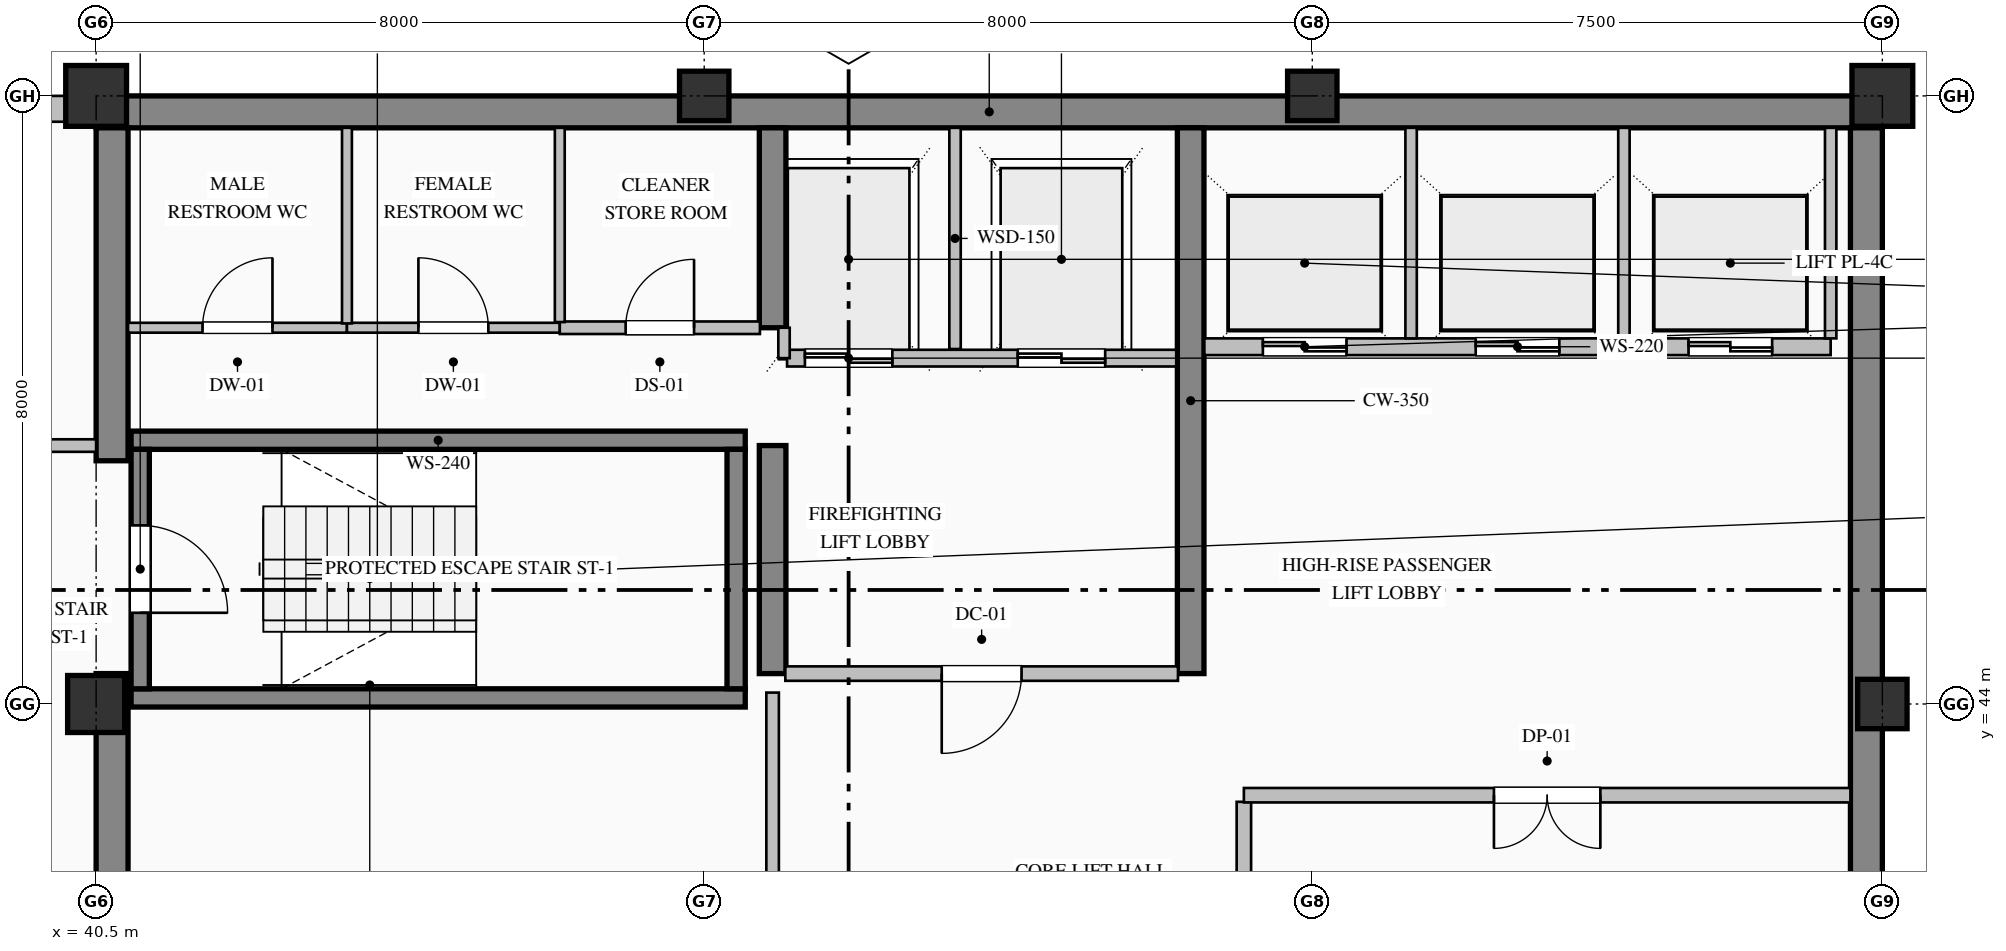
"""IFC4 building model, lengths in metres.
Left out: names, types, materials, properties, quantities, classifications, styles, units other than length and angle.
Written with IfcOpenShell. Run it as: python <this file> out.ifc"""

import sys

from ifc_helpers import new_model, si_unit, direction, frame, frame_2d, origin, origin_2d, place, context, subcontext, project, spatial, rectangle, hollow_rectangle, extrude, element, fill, save


model = new_model("IFC4")
c1 = context("Model", 3, precision=1e-05, world=origin(), true_north=direction((0.0, 1.0)))
c2 = subcontext(c1, "Body", "Model", "MODEL_VIEW")
j1 = project(units=[si_unit("LENGTHUNIT", "METRE"), si_unit("PLANEANGLEUNIT", "RADIAN")], contexts=[c1])
p1 = place(None, origin())
s1 = spatial("IfcSite", under=j1, at=p1, CompositionType="ELEMENT")
p2 = place(p1, origin())
s2 = spatial("IfcBuilding", under=s1, at=p2, CompositionType="ELEMENT")
p3 = place(p2, frame((0.0, 0.0, 351.2)))
s3 = spatial("IfcBuildingStorey", under=s2, at=p3, CompositionType="ELEMENT", Elevation=351.2)
p4 = place(p3, frame((40.5, 51.79, 0.0), z_axis=(0.0, 0.0, 1.0), x_axis=(1.0, 0.0, 0.0)))
e1 = element("IfcWall", 1, at=p4, inside=s3, PredefinedType="SHEAR", context=c2, shape_type="SweptSolid", body=[
    extrude(rectangle(XDim=23.5, YDim=0.42, at=frame_2d((11.75, 0.0))), origin(), (0.0, 0.0, 1.0), 3.785),
])
p5 = place(p3, frame((63.79, 36.32, 0.0), z_axis=(0.0, 0.0, 1.0), x_axis=(0.0, 1.0, 0.0)))
e2 = element("IfcWall", 2, at=p5, inside=s3, PredefinedType="SHEAR", context=c2, shape_type="SweptSolid", body=[
    extrude(rectangle(XDim=15.26, YDim=0.42, at=frame_2d((7.63, 0.0))), origin(), (0.0, 0.0, 1.0), 3.785),
])
p6 = place(p3, frame((40.71, 36.42, 0.0), z_axis=(0.0, 0.0, 1.0), x_axis=(0.0, 1.0, 0.0)))
e3 = element("IfcWall", 3, at=p6, inside=s3, PredefinedType="SHEAR", context=c2, shape_type="SweptSolid", body=[
    extrude(rectangle(XDim=7.98, YDim=0.42, at=frame_2d((3.99, 0.0))), origin(), (0.0, 0.0, 1.0), 3.785),
])
p7 = place(p3, frame((40.71, 47.2, 0.0), z_axis=(0.0, 0.0, 1.0), x_axis=(0.0, 1.0, 0.0)))
e4 = element("IfcWall", 4, at=p7, inside=s3, PredefinedType="SHEAR", context=c2, shape_type="SweptSolid", body=[
    extrude(rectangle(XDim=4.38, YDim=0.42, at=frame_2d((2.19, 0.0))), origin(), (0.0, 0.0, 1.0), 3.785),
])
p8 = place(p3, frame((49.4, 44.4, 0.0), z_axis=(0.0, 0.0, 1.0), x_axis=(0.0, 1.0, 0.0)))
e5 = element("IfcWall", 5, at=p8, inside=s3, PredefinedType="SHEAR", context=c2, shape_type="SweptSolid", body=[
    extrude(rectangle(XDim=3.0, YDim=0.35, at=frame_2d((1.5, 0.0))), origin(), (0.0, 0.0, 1.0), 3.785),
])
p9 = place(p3, frame((49.4, 48.95, 0.0), z_axis=(0.0, 0.0, 1.0), x_axis=(0.0, 1.0, 0.0)))
e6 = element("IfcWall", 6, at=p9, inside=s3, PredefinedType="SHEAR", context=c2, shape_type="SweptSolid", body=[
    extrude(rectangle(XDim=2.63, YDim=0.35, at=frame_2d((1.315, 0.0))), origin(), (0.0, 0.0, 1.0), 3.785),
])
p10 = place(p3, frame((54.9, 44.4, 0.0), z_axis=(0.0, 0.0, 1.0), x_axis=(0.0, 1.0, 0.0)))
e7 = element("IfcWall", 7, at=p10, inside=s3, PredefinedType="SHEAR", context=c2, shape_type="SweptSolid", body=[
    extrude(rectangle(XDim=7.18, YDim=0.35, at=frame_2d((3.59, 0.0))), origin(), (0.0, 0.0, 1.0), 3.785),
])
p11 = place(p3, frame((40.5, 44.0, 0.0), z_axis=(0.0, 0.0, 1.0), x_axis=(1.0, 0.0, 0.0)))
e8 = element("IfcColumn", 8, at=p11, inside=s3, PredefinedType="COLUMN", context=c2, shape_type="SweptSolid", body=[
    extrude(rectangle(XDim=0.75, YDim=0.75, at=origin_2d()), origin(), (0.0, 0.0, 1.0), 4.0),
])
p12 = place(p3, frame((40.5, 52.0, 0.0), z_axis=(0.0, 0.0, 1.0), x_axis=(1.0, 0.0, 0.0)))
e9 = element("IfcColumn", 9, at=p12, inside=s3, PredefinedType="COLUMN", context=c2, shape_type="SweptSolid", body=[
    extrude(hollow_rectangle(XDim=0.8, YDim=0.8, WallThickness=0.032, at=origin_2d()), origin(), (0.0, 0.0, 1.0), 4.0),
])
for number, where, z_axis, x_axis in (
    (10, (48.5, 52.0, 0.0), (0.0, 0.0, 1.0), (1.0, 0.0, 0.0)),
    (11, (56.5, 52.0, 0.0), (0.0, 0.0, 1.0), (1.0, 0.0, 0.0)),
    (12, (64.0, 44.0, 0.0), (0.0, 0.0, 1.0), (1.0, 0.0, 0.0)),
):
    element("IfcColumn", number, at=place(p3, frame(where, z_axis=z_axis, x_axis=x_axis)), inside=s3, PredefinedType="COLUMN", context=c2, shape_type="SweptSolid", body=[
        extrude(hollow_rectangle(XDim=0.65, YDim=0.65, WallThickness=0.028, at=origin_2d()), origin(), (0.0, 0.0, 1.0), 4.0),
    ])
p13 = place(p3, frame((64.0, 52.0, 0.0), z_axis=(0.0, 0.0, 1.0), x_axis=(1.0, 0.0, 0.0)))
e13 = element("IfcColumn", 13, at=p13, inside=s3, PredefinedType="COLUMN", context=c2, shape_type="SweptSolid", body=[
    extrude(hollow_rectangle(XDim=0.8, YDim=0.8, WallThickness=0.032, at=origin_2d()), origin(), (0.0, 0.0, 1.0), 4.0),
])
p14 = place(p3, frame((20.5, 51.83, 0.0), z_axis=(0.0, 0.0, 1.0), x_axis=(1.0, 0.0, 0.0)))
e14 = element("IfcWall", 14, at=p14, inside=s3, PredefinedType="SOLIDWALL", context=c2, shape_type="SweptSolid", body=[
    extrude(rectangle(XDim=20.02, YDim=0.34, at=frame_2d((10.01, 0.0))), origin(), (0.0, 0.0, 1.0), 3.335),
])
p15 = place(p14, frame((6.675, 0.0, 0.8)))
e15 = element("IfcOpeningElement", 15, at=p15, cuts=e14, PredefinedType="OPENING", context=c2, shape_type="SweptSolid", body=[
    extrude(rectangle(XDim=1.05, YDim=2.15, at=frame_2d((0.525, 1.075))), frame((0.0, 0.18, 0.0), z_axis=(0.0, -1.0, 0.0), x_axis=(1.0, 0.0, 0.0)), (0.0, 0.0, 1.0), 0.36),
])
for number, where, z_axis, x_axis in (
    (16, (40.96, 47.47, 0.0), (0.0, 0.0, 1.0), (1.0, 0.0, 0.0)),
    (17, (49.04, 44.08, 0.0), (0.0, 0.0, 1.0), (-1.0, 0.0, 0.0)),
):
    element("IfcWall", number, at=place(p3, frame(where, z_axis=z_axis, x_axis=x_axis)), inside=s3, PredefinedType="SOLIDWALL", context=c2, shape_type="SweptSolid", body=[
        extrude(rectangle(XDim=8.08, YDim=0.24, at=frame_2d((4.04, 0.0))), origin(), (0.0, 0.0, 1.0), 4.0),
    ])
p16 = place(p3, frame((41.08, 47.35, 0.0), z_axis=(0.0, 0.0, 1.0), x_axis=(0.0, -1.0, 0.0)))
e18 = element("IfcWall", 18, at=p16, inside=s3, PredefinedType="SOLIDWALL", context=c2, shape_type="SweptSolid", body=[
    extrude(rectangle(XDim=3.15, YDim=0.24, at=frame_2d((1.575, 0.0))), origin(), (0.0, 0.0, 1.0), 4.0),
])
p17 = place(p16, frame((1.0, 0.0, 0.0)))
e19 = element("IfcOpeningElement", 19, at=p17, cuts=e18, PredefinedType="OPENING", context=c2, shape_type="SweptSolid", body=[
    extrude(rectangle(XDim=1.15, YDim=2.2, at=frame_2d((0.575, 1.1))), frame((0.0, 0.13, 0.0), z_axis=(0.0, -1.0, 0.0), x_axis=(1.0, 0.0, 0.0)), (0.0, 0.0, 1.0), 0.26),
])
p18 = place(p3, frame((48.92, 44.2, 0.0), z_axis=(0.0, 0.0, 1.0), x_axis=(0.0, 1.0, 0.0)))
e20 = element("IfcWall", 20, at=p18, inside=s3, PredefinedType="SOLIDWALL", context=c2, shape_type="SweptSolid", body=[
    extrude(rectangle(XDim=3.15, YDim=0.24, at=frame_2d((1.575, 0.0))), origin(), (0.0, 0.0, 1.0), 4.0),
])
p19 = place(p3, frame((54.71, 48.55, 0.0), z_axis=(0.0, 0.0, 1.0), x_axis=(-1.0, 0.0, 0.0)))
e21 = element("IfcWall", 21, at=p19, inside=s3, PredefinedType="PARTITIONING", context=c2, shape_type="SweptSolid", body=[
    extrude(rectangle(XDim=5.12, YDim=0.22, at=frame_2d((2.56, 0.0))), origin(), (0.0, 0.0, 1.0), 3.785),
])
p20 = place(p19, frame((3.735, 0.0, 0.0)))
e22 = element("IfcOpeningElement", 22, at=p20, cuts=e21, PredefinedType="OPENING", context=c2, shape_type="SweptSolid", body=[
    extrude(rectangle(XDim=1.15, YDim=2.2, at=frame_2d((0.575, 1.1))), frame((0.0, 0.12, 0.0), z_axis=(0.0, -1.0, 0.0), x_axis=(1.0, 0.0, 0.0)), (0.0, 0.0, 1.0), 0.24),
])
p21 = place(p19, frame((0.935, 0.0, 0.0)))
e23 = element("IfcOpeningElement", 23, at=p21, cuts=e21, PredefinedType="OPENING", context=c2, shape_type="SweptSolid", body=[
    extrude(rectangle(XDim=1.15, YDim=2.2, at=frame_2d((0.575, 1.1))), frame((0.0, 0.12, 0.0), z_axis=(0.0, -1.0, 0.0), x_axis=(1.0, 0.0, 0.0)), (0.0, 0.0, 1.0), 0.24),
])
p22 = place(p3, frame((51.8, 48.67, 0.0), z_axis=(0.0, 0.0, 1.0), x_axis=(0.0, 1.0, 0.0)))
e24 = element("IfcWall", 24, at=p22, inside=s3, PredefinedType="PARTITIONING", context=c2, shape_type="SweptSolid", body=[
    extrude(rectangle(XDim=2.91, YDim=0.15, at=frame_2d((1.455, 0.0))), origin(), (0.0, 0.0, 1.0), 3.785),
])
p23 = place(p3, frame((49.55, 48.55, 0.0), z_axis=(0.0, 0.0, 1.0), x_axis=(0.0, 1.0, 0.0)))
e25 = element("IfcWall", 25, at=p23, inside=s3, PredefinedType="PARTITIONING", context=c2, shape_type="SweptSolid", body=[
    extrude(rectangle(XDim=0.4, YDim=0.15, at=frame_2d((0.2, 0.0))), origin(), (0.0, 0.0, 1.0), 3.785),
])
p24 = place(p3, frame((63.32, 48.7, 0.0), z_axis=(0.0, 0.0, 1.0), x_axis=(-1.0, 0.0, 0.0)))
e26 = element("IfcWall", 26, at=p24, inside=s3, PredefinedType="PARTITIONING", context=c2, shape_type="SweptSolid", body=[
    extrude(rectangle(XDim=8.24, YDim=0.22, at=frame_2d((4.12, 0.0))), origin(), (0.0, 0.0, 1.0), 3.785),
])
p25 = place(p24, frame((6.37, 0.0, 0.0)))
e27 = element("IfcOpeningElement", 27, at=p25, cuts=e26, PredefinedType="OPENING", context=c2, shape_type="SweptSolid", body=[
    extrude(rectangle(XDim=1.1, YDim=2.2, at=frame_2d((0.55, 1.1))), frame((0.0, 0.12, 0.0), z_axis=(0.0, -1.0, 0.0), x_axis=(1.0, 0.0, 0.0)), (0.0, 0.0, 1.0), 0.24),
])
p26 = place(p24, frame((3.57, 0.0, 0.0)))
e28 = element("IfcOpeningElement", 28, at=p26, cuts=e26, PredefinedType="OPENING", context=c2, shape_type="SweptSolid", body=[
    extrude(rectangle(XDim=1.1, YDim=2.2, at=frame_2d((0.55, 1.1))), frame((0.0, 0.12, 0.0), z_axis=(0.0, -1.0, 0.0), x_axis=(1.0, 0.0, 0.0)), (0.0, 0.0, 1.0), 0.24),
])
p27 = place(p24, frame((0.77, 0.0, 0.0)))
e29 = element("IfcOpeningElement", 29, at=p27, cuts=e26, PredefinedType="OPENING", context=c2, shape_type="SweptSolid", body=[
    extrude(rectangle(XDim=1.1, YDim=2.2, at=frame_2d((0.55, 1.1))), frame((0.0, 0.12, 0.0), z_axis=(0.0, -1.0, 0.0), x_axis=(1.0, 0.0, 0.0)), (0.0, 0.0, 1.0), 0.24),
])
for number, where, z_axis, x_axis in (
    (30, (57.8, 48.81, 0.0), (0.0, 0.0, 1.0), (0.0, 1.0, 0.0)),
    (31, (60.6, 48.81, 0.0), (0.0, 0.0, 1.0), (0.0, 1.0, 0.0)),
    (32, (63.32, 48.81, 0.0), (0.0, 0.0, 1.0), (0.0, 1.0, 0.0)),
):
    element("IfcWall", number, at=place(p3, frame(where, z_axis=z_axis, x_axis=x_axis)), inside=s3, PredefinedType="PARTITIONING", context=c2, shape_type="SweptSolid", body=[
        extrude(rectangle(XDim=2.77, YDim=0.15, at=frame_2d((1.385, 0.0))), origin(), (0.0, 0.0, 1.0), 3.785),
    ])
p28 = place(p3, frame((37.8, 47.4, 0.0), z_axis=(0.0, 0.0, 1.0), x_axis=(1.0, 0.0, 0.0)))
e33 = element("IfcWall", 33, at=p28, inside=s3, PredefinedType="PARTITIONING", context=c2, shape_type="SweptSolid", body=[
    extrude(rectangle(XDim=2.7, YDim=0.165, at=frame_2d((1.35, 0.0))), origin(), (0.0, 0.0, 1.0), 3.785),
])
p29 = place(p28, frame((0.825, 0.0, 0.0)))
e34 = element("IfcOpeningElement", 34, at=p29, cuts=e33, PredefinedType="OPENING", context=c2, shape_type="SweptSolid", body=[
    extrude(rectangle(XDim=1.05, YDim=2.15, at=frame_2d((0.525, 1.075))), frame((0.0, 0.093, 0.0), z_axis=(0.0, -1.0, 0.0), x_axis=(1.0, 0.0, 0.0)), (0.0, 0.0, 1.0), 0.185),
])
p30 = place(p3, frame((40.92, 48.95, 0.0), z_axis=(0.0, 0.0, 1.0), x_axis=(1.0, 0.0, 0.0)))
e35 = element("IfcWall", 35, at=p30, inside=s3, PredefinedType="PARTITIONING", context=c2, shape_type="SweptSolid", body=[
    extrude(rectangle(XDim=2.88, YDim=0.13, at=frame_2d((1.44, 0.0))), origin(), (0.0, 0.0, 1.0), 3.785),
])
p31 = place(p30, frame((0.98, 0.0, 0.0)))
e36 = element("IfcOpeningElement", 36, at=p31, cuts=e35, PredefinedType="OPENING", context=c2, shape_type="SweptSolid", body=[
    extrude(rectangle(XDim=0.92, YDim=2.15, at=frame_2d((0.46, 1.075))), frame((0.0, 0.075, 0.0), z_axis=(0.0, -1.0, 0.0), x_axis=(1.0, 0.0, 0.0)), (0.0, 0.0, 1.0), 0.15),
])
p32 = place(p3, frame((43.8, 48.95, 0.0), z_axis=(0.0, 0.0, 1.0), x_axis=(1.0, 0.0, 0.0)))
e37 = element("IfcWall", 37, at=p32, inside=s3, PredefinedType="PARTITIONING", context=c2, shape_type="SweptSolid", body=[
    extrude(rectangle(XDim=2.8, YDim=0.13, at=frame_2d((1.4, 0.0))), origin(), (0.0, 0.0, 1.0), 3.785),
])
p33 = place(p32, frame((0.94, 0.0, 0.0)))
e38 = element("IfcOpeningElement", 38, at=p33, cuts=e37, PredefinedType="OPENING", context=c2, shape_type="SweptSolid", body=[
    extrude(rectangle(XDim=0.92, YDim=2.15, at=frame_2d((0.46, 1.075))), frame((0.0, 0.075, 0.0), z_axis=(0.0, -1.0, 0.0), x_axis=(1.0, 0.0, 0.0)), (0.0, 0.0, 1.0), 0.15),
])
p34 = place(p3, frame((46.6, 48.95, 0.0), z_axis=(0.0, 0.0, 1.0), x_axis=(1.0, 0.0, 0.0)))
e39 = element("IfcWall", 39, at=p34, inside=s3, PredefinedType="PARTITIONING", context=c2, shape_type="SweptSolid", body=[
    extrude(rectangle(XDim=2.633, YDim=0.165, at=frame_2d((1.316, 0.0))), origin(), (0.0, 0.0, 1.0), 3.785),
])
p35 = place(p34, frame((0.866, 0.0, 0.0)))
e40 = element("IfcOpeningElement", 40, at=p35, cuts=e39, PredefinedType="OPENING", context=c2, shape_type="SweptSolid", body=[
    extrude(rectangle(XDim=0.9, YDim=2.15, at=frame_2d((0.45, 1.075))), frame((0.0, 0.093, 0.0), z_axis=(0.0, -1.0, 0.0), x_axis=(1.0, 0.0, 0.0)), (0.0, 0.0, 1.0), 0.185),
])
p36 = place(p3, frame((54.733, 44.4, 0.0), z_axis=(0.0, 0.0, 1.0), x_axis=(-1.0, 0.0, 0.0)))
e41 = element("IfcWall", 41, at=p36, inside=s3, PredefinedType="PARTITIONING", context=c2, shape_type="SweptSolid", body=[
    extrude(rectangle(XDim=5.166, YDim=0.19, at=frame_2d((2.583, 0.0))), origin(), (0.0, 0.0, 1.0), 3.785),
])
p37 = place(p36, frame((2.058, 0.0, 0.0)))
e42 = element("IfcOpeningElement", 42, at=p37, cuts=e41, PredefinedType="OPENING", context=c2, shape_type="SweptSolid", body=[
    extrude(rectangle(XDim=1.05, YDim=2.15, at=frame_2d((0.525, 1.075))), frame((0.0, 0.105, 0.0), z_axis=(0.0, -1.0, 0.0), x_axis=(1.0, 0.0, 0.0)), (0.0, 0.0, 1.0), 0.21),
])
p38 = place(p3, frame((49.4, 36.42, 0.0), z_axis=(0.0, 0.0, 1.0), x_axis=(0.0, 1.0, 0.0)))
e43 = element("IfcWall", 43, at=p38, inside=s3, PredefinedType="PARTITIONING", context=c2, shape_type="SweptSolid", body=[
    extrude(rectangle(XDim=7.73, YDim=0.165, at=frame_2d((3.865, 0.0))), origin(), (0.0, 0.0, 1.0), 3.027),
])
p39 = place(p38, frame((3.365, 0.0, 0.0)))
e44 = element("IfcOpeningElement", 44, at=p39, cuts=e43, PredefinedType="OPENING", context=c2, shape_type="SweptSolid", body=[
    extrude(rectangle(XDim=1.0, YDim=2.15, at=frame_2d((0.5, 1.075))), frame((0.0, 0.093, 0.0), z_axis=(0.0, -1.0, 0.0), x_axis=(1.0, 0.0, 0.0)), (0.0, 0.0, 1.0), 0.185),
])
p40 = place(p3, frame((55.6, 42.713, 0.0), z_axis=(0.0, 0.0, 1.0), x_axis=(0.0, -1.0, 0.0)))
e45 = element("IfcWall", 45, at=p40, inside=s3, PredefinedType="PARTITIONING", context=c2, shape_type="SweptSolid", body=[
    extrude(rectangle(XDim=2.731, YDim=0.19, at=frame_2d((1.365, 0.0))), origin(), (0.0, 0.0, 1.0), 3.785),
])
p41 = place(p3, frame((63.58, 42.8, 0.0), z_axis=(0.0, 0.0, 1.0), x_axis=(-1.0, 0.0, 0.0)))
e46 = element("IfcWall", 46, at=p41, inside=s3, PredefinedType="PARTITIONING", context=c2, shape_type="SweptSolid", body=[
    extrude(rectangle(XDim=7.98, YDim=0.19, at=frame_2d((3.99, 0.0))), origin(), (0.0, 0.0, 1.0), 3.785),
])
p42 = place(p41, frame((3.29, 0.0, 0.0)))
e47 = element("IfcOpeningElement", 47, at=p42, cuts=e46, PredefinedType="OPENING", context=c2, shape_type="SweptSolid", body=[
    extrude(rectangle(XDim=1.4, YDim=2.25, at=frame_2d((0.7, 1.125))), frame((0.0, 0.105, 0.0), z_axis=(0.0, -1.0, 0.0), x_axis=(1.0, 0.0, 0.0)), (0.0, 0.0, 1.0), 0.21),
])
p43 = place(p3, frame((43.8, 51.58, 0.0), z_axis=(0.0, 0.0, 1.0), x_axis=(0.0, -1.0, 0.0)))
e48 = element("IfcWall", 48, at=p43, inside=s3, PredefinedType="PARTITIONING", context=c2, shape_type="SweptSolid", body=[
    extrude(rectangle(XDim=2.573, YDim=0.13, at=frame_2d((1.287, 0.0))), origin(), (0.0, 0.0, 1.0), 3.785),
])
p44 = place(p3, frame((46.6, 51.58, 0.0), z_axis=(0.0, 0.0, 1.0), x_axis=(0.0, -1.0, 0.0)))
e49 = element("IfcWall", 49, at=p44, inside=s3, PredefinedType="PARTITIONING", context=c2, shape_type="SweptSolid", body=[
    extrude(rectangle(XDim=2.556, YDim=0.13, at=frame_2d((1.278, 0.0))), origin(), (0.0, 0.0, 1.0), 3.785),
])
p45 = place(p17, origin())
e50 = element("IfcDoor", 50, at=p45, inside=s3, OperationType="SINGLE_SWING_RIGHT", PredefinedType="DOOR", context=c2, shape_type="SweptSolid", body=[
    extrude(rectangle(XDim=1.15, YDim=2.2, at=frame_2d((0.575, 1.1))), frame((0.0, 0.025, 0.0), z_axis=(0.0, -1.0, 0.0), x_axis=(1.0, 0.0, 0.0)), (0.0, 0.0, 1.0), 0.05),
])
fill(e19, e50)
p46 = place(p20, origin())
e51 = element("IfcDoor", 51, at=p46, inside=s3, OperationType="DOUBLE_DOOR_SLIDING", PredefinedType="DOOR", context=c2, shape_type="SweptSolid", body=[
    extrude(rectangle(XDim=1.15, YDim=2.2, at=frame_2d((0.575, 1.1))), frame((0.0, 0.025, 0.0), z_axis=(0.0, -1.0, 0.0), x_axis=(1.0, 0.0, 0.0)), (0.0, 0.0, 1.0), 0.05),
])
fill(e22, e51)
p47 = place(p21, origin())
e52 = element("IfcDoor", 52, at=p47, inside=s3, OperationType="DOUBLE_DOOR_SLIDING", PredefinedType="DOOR", context=c2, shape_type="SweptSolid", body=[
    extrude(rectangle(XDim=1.15, YDim=2.2, at=frame_2d((0.575, 1.1))), frame((0.0, 0.025, 0.0), z_axis=(0.0, -1.0, 0.0), x_axis=(1.0, 0.0, 0.0)), (0.0, 0.0, 1.0), 0.05),
])
fill(e23, e52)
p48 = place(p25, origin())
e53 = element("IfcDoor", 53, at=p48, inside=s3, OperationType="DOUBLE_DOOR_SLIDING", PredefinedType="DOOR", context=c2, shape_type="SweptSolid", body=[
    extrude(rectangle(XDim=1.1, YDim=2.2, at=frame_2d((0.55, 1.1))), frame((0.0, 0.025, 0.0), z_axis=(0.0, -1.0, 0.0), x_axis=(1.0, 0.0, 0.0)), (0.0, 0.0, 1.0), 0.05),
])
fill(e27, e53)
p49 = place(p26, origin())
e54 = element("IfcDoor", 54, at=p49, inside=s3, OperationType="DOUBLE_DOOR_SLIDING", PredefinedType="DOOR", context=c2, shape_type="SweptSolid", body=[
    extrude(rectangle(XDim=1.1, YDim=2.2, at=frame_2d((0.55, 1.1))), frame((0.0, 0.025, 0.0), z_axis=(0.0, -1.0, 0.0), x_axis=(1.0, 0.0, 0.0)), (0.0, 0.0, 1.0), 0.05),
])
fill(e28, e54)
p50 = place(p27, origin())
e55 = element("IfcDoor", 55, at=p50, inside=s3, OperationType="DOUBLE_DOOR_SLIDING", PredefinedType="DOOR", context=c2, shape_type="SweptSolid", body=[
    extrude(rectangle(XDim=1.1, YDim=2.2, at=frame_2d((0.55, 1.1))), frame((0.0, 0.025, 0.0), z_axis=(0.0, -1.0, 0.0), x_axis=(1.0, 0.0, 0.0)), (0.0, 0.0, 1.0), 0.05),
])
fill(e29, e55)
p51 = place(p37, origin())
e56 = element("IfcDoor", 56, at=p51, inside=s3, OperationType="SINGLE_SWING_RIGHT", PredefinedType="DOOR", context=c2, shape_type="SweptSolid", body=[
    extrude(rectangle(XDim=1.05, YDim=2.15, at=frame_2d((0.525, 1.075))), frame((0.0, 0.025, 0.0), z_axis=(0.0, -1.0, 0.0), x_axis=(1.0, 0.0, 0.0)), (0.0, 0.0, 1.0), 0.05),
])
fill(e42, e56)
p52 = place(p31, origin())
e57 = element("IfcDoor", 57, at=p52, inside=s3, OperationType="SINGLE_SWING_RIGHT", PredefinedType="DOOR", context=c2, shape_type="SweptSolid", body=[
    extrude(rectangle(XDim=0.92, YDim=2.15, at=frame_2d((0.46, 1.075))), frame((0.0, 0.025, 0.0), z_axis=(0.0, -1.0, 0.0), x_axis=(1.0, 0.0, 0.0)), (0.0, 0.0, 1.0), 0.05),
])
fill(e36, e57)
p53 = place(p33, origin())
e58 = element("IfcDoor", 58, at=p53, inside=s3, OperationType="SINGLE_SWING_LEFT", PredefinedType="DOOR", context=c2, shape_type="SweptSolid", body=[
    extrude(rectangle(XDim=0.92, YDim=2.15, at=frame_2d((0.46, 1.075))), frame((0.0, 0.025, 0.0), z_axis=(0.0, -1.0, 0.0), x_axis=(1.0, 0.0, 0.0)), (0.0, 0.0, 1.0), 0.05),
])
fill(e38, e58)
p54 = place(p35, origin())
e59 = element("IfcDoor", 59, at=p54, inside=s3, OperationType="SINGLE_SWING_RIGHT", PredefinedType="DOOR", context=c2, shape_type="SweptSolid", body=[
    extrude(rectangle(XDim=0.9, YDim=2.15, at=frame_2d((0.45, 1.075))), frame((0.0, 0.025, 0.0), z_axis=(0.0, -1.0, 0.0), x_axis=(1.0, 0.0, 0.0)), (0.0, 0.0, 1.0), 0.05),
])
fill(e40, e59)
p55 = place(p42, origin())
e60 = element("IfcDoor", 60, at=p55, inside=s3, OperationType="DOUBLE_DOOR_SINGLE_SWING", PredefinedType="DOOR", context=c2, shape_type="SweptSolid", body=[
    extrude(rectangle(XDim=1.4, YDim=2.25, at=frame_2d((0.7, 1.125))), frame((0.0, 0.025, 0.0), z_axis=(0.0, -1.0, 0.0), x_axis=(1.0, 0.0, 0.0)), (0.0, 0.0, 1.0), 0.05),
])
fill(e47, e60)
save(model, sys.argv[1])
